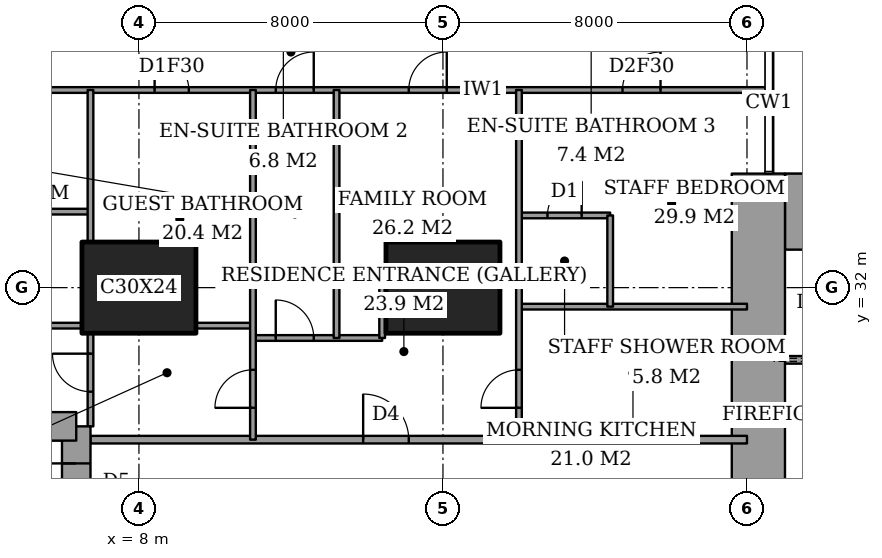
"""IFC4 building model, lengths in metres.
Left out: names, types, materials, properties, quantities, classifications, styles, units other than length and angle.
Written with IfcOpenShell. Run it as: python <this file> out.ifc"""

import sys

from ifc_helpers import new_model, si_unit, direction, frame, frame_2d, origin, origin_2d, place, context, subcontext, project, spatial, rectangle, extrude, element, fill, save


model = new_model("IFC4")
c1 = context("Model", 3, precision=1e-05, world=origin(), true_north=direction((0.0, 1.0)))
c2 = subcontext(c1, "Body", "Model", "MODEL_VIEW")
j1 = project(units=[si_unit("LENGTHUNIT", "METRE"), si_unit("PLANEANGLEUNIT", "RADIAN")], contexts=[c1])
p1 = place(None, origin())
s1 = spatial("IfcSite", under=j1, at=p1, CompositionType="ELEMENT")
p2 = place(p1, origin())
s2 = spatial("IfcBuilding", under=s1, at=p2, CompositionType="ELEMENT")
p3 = place(p2, frame((0.0, 0.0, 203.8)))
s3 = spatial("IfcBuildingStorey", under=s2, at=p3, CompositionType="ELEMENT", Elevation=203.8)
for number, where, z_axis, x_axis in (
    (1, (8.0, 32.0, 0.0), (0.0, 0.0, 1.0), (1.0, 0.0, 0.0)),
    (2, (16.0, 32.0, 0.0), (0.0, 0.0, 1.0), (1.0, 0.0, 0.0)),
):
    element("IfcColumn", number, at=place(p3, frame(where, z_axis=z_axis, x_axis=x_axis)), inside=s3, PredefinedType="COLUMN", context=c2, shape_type="SweptSolid", body=[
        extrude(rectangle(XDim=3.0, YDim=2.4, at=origin_2d()), origin(), (0.0, 0.0, 1.0), 3.6),
    ])
p4 = place(p3, frame((25.0, 34.0, 0.0), z_axis=(0.0, 0.0, 1.0), x_axis=(1.0, 0.0, 0.0)))
e3 = element("IfcWall", 3, at=p4, inside=s3, PredefinedType="SHEAR", context=c2, shape_type="SweptSolid", body=[
    extrude(rectangle(XDim=3.15, YDim=2.0, at=frame_2d((1.575, 0.0))), origin(), (0.0, 0.0, 1.0), 3.6),
])
p5 = place(p3, frame((24.3, 23.15, 0.0), z_axis=(0.0, 0.0, 1.0), x_axis=(0.0, 1.0, 0.0)))
e4 = element("IfcWall", 4, at=p5, inside=s3, PredefinedType="SHEAR", context=c2, shape_type="SweptSolid", body=[
    extrude(rectangle(XDim=11.85, YDim=1.4, at=frame_2d((5.925, 0.0))), origin(), (0.0, 0.0, 1.0), 3.6),
])
p6 = place(p5, frame((0.75, 0.0, 0.0)))
e5 = element("IfcOpeningElement", 5, at=p6, cuts=e4, PredefinedType="OPENING", context=c2, shape_type="SweptSolid", body=[
    extrude(rectangle(XDim=1.8, YDim=2.4, at=frame_2d((0.9, 1.2))), frame((0.0, 0.71, 0.0), z_axis=(0.0, -1.0, 0.0), x_axis=(1.0, 0.0, 0.0)), (0.0, 0.0, 1.0), 1.42),
])
p7 = place(p3, frame((6.35, 19.65, 0.0), z_axis=(0.0, 0.0, 1.0), x_axis=(0.0, 1.0, 0.0)))
e6 = element("IfcWall", 6, at=p7, inside=s3, PredefinedType="SHEAR", context=c2, shape_type="SweptSolid", body=[
    extrude(rectangle(XDim=8.7, YDim=0.75, at=frame_2d((4.35, 0.0))), origin(), (0.0, 0.0, 1.0), 3.6),
])
p8 = place(p7, frame((6.725, 0.0, 0.0)))
e7 = element("IfcOpeningElement", 7, at=p8, cuts=e6, PredefinedType="OPENING", context=c2, shape_type="SweptSolid", body=[
    extrude(rectangle(XDim=1.0, YDim=2.1, at=frame_2d((0.5, 1.05))), frame((0.0, 0.385, 0.0), z_axis=(0.0, -1.0, 0.0), x_axis=(1.0, 0.0, 0.0)), (0.0, 0.0, 1.0), 0.77),
])
p9 = place(p3, frame((6.35, 28.35, 0.0), z_axis=(0.0, 0.0, 1.0), x_axis=(-1.0, 0.0, 0.0)))
e8 = element("IfcWall", 8, at=p9, inside=s3, PredefinedType="SHEAR", context=c2, shape_type="SweptSolid", body=[
    extrude(rectangle(XDim=4.45, YDim=0.75, at=frame_2d((2.225, 0.0))), origin(), (0.0, 0.0, 1.0), 3.6),
])
p10 = place(p3, frame((6.725, 28.0, 0.0), z_axis=(0.0, 0.0, 1.0), x_axis=(1.0, 0.0, 0.0)))
e9 = element("IfcWall", 9, at=p10, inside=s3, PredefinedType="PARTITIONING", context=c2, shape_type="SweptSolid", body=[
    extrude(rectangle(XDim=17.275, YDim=0.2, at=frame_2d((8.637, 0.0))), origin(), (0.0, 0.0, 1.0), 3.35),
])
p11 = place(p10, frame((7.175, 0.0, 0.0)))
e10 = element("IfcOpeningElement", 10, at=p11, cuts=e9, PredefinedType="OPENING", context=c2, shape_type="SweptSolid", body=[
    extrude(rectangle(XDim=1.2, YDim=2.4, at=frame_2d((0.6, 1.2))), frame((0.0, 0.11, 0.0), z_axis=(0.0, -1.0, 0.0), x_axis=(1.0, 0.0, 0.0)), (0.0, 0.0, 1.0), 0.22),
])
p12 = place(p3, frame((11.0, 30.675, 0.0), z_axis=(0.0, 0.0, 1.0), x_axis=(1.0, 0.0, 0.0)))
e11 = element("IfcWall", 11, at=p12, inside=s3, PredefinedType="PARTITIONING", context=c2, shape_type="SweptSolid", body=[
    extrude(rectangle(XDim=3.4, YDim=0.15, at=frame_2d((1.7, 0.0))), origin(), (0.0, 0.0, 1.0), 3.35),
])
p13 = place(p12, frame((0.6, 0.0, 0.0)))
e12 = element("IfcOpeningElement", 12, at=p13, cuts=e11, PredefinedType="OPENING", context=c2, shape_type="SweptSolid", body=[
    extrude(rectangle(XDim=1.0, YDim=2.1, at=frame_2d((0.5, 1.05))), frame((0.0, 0.085, 0.0), z_axis=(0.0, -1.0, 0.0), x_axis=(1.0, 0.0, 0.0)), (0.0, 0.0, 1.0), 0.17),
])
p14 = place(p3, frame((-0.45, 31.0, 0.0), z_axis=(0.0, 0.0, 1.0), x_axis=(1.0, 0.0, 0.0)))
e13 = element("IfcWall", 13, at=p14, inside=s3, PredefinedType="PARTITIONING", context=c2, shape_type="SweptSolid", body=[
    extrude(rectangle(XDim=6.95, YDim=0.15, at=frame_2d((3.475, 0.0))), origin(), (0.0, 0.0, 1.0), 3.35),
])
p15 = place(p3, frame((9.5, 31.0, 0.0), z_axis=(0.0, 0.0, 1.0), x_axis=(1.0, 0.0, 0.0)))
e14 = element("IfcWall", 14, at=p15, inside=s3, PredefinedType="PARTITIONING", context=c2, shape_type="SweptSolid", body=[
    extrude(rectangle(XDim=1.5, YDim=0.15, at=frame_2d((0.75, 0.0))), origin(), (0.0, 0.0, 1.0), 3.35),
])
p16 = place(p3, frame((18.0, 31.5, 0.0), z_axis=(0.0, 0.0, 1.0), x_axis=(1.0, 0.0, 0.0)))
e15 = element("IfcWall", 15, at=p16, inside=s3, PredefinedType="PARTITIONING", context=c2, shape_type="SweptSolid", body=[
    extrude(rectangle(XDim=6.0, YDim=0.15, at=frame_2d((3.0, 0.0))), origin(), (0.0, 0.0, 1.0), 3.35),
])
p17 = place(p3, frame((17.5, 32.1, 0.0), z_axis=(0.0, 0.0, 1.0), x_axis=(1.0, 0.0, 0.0)))
e16 = element("IfcWall", 16, at=p17, inside=s3, PredefinedType="PARTITIONING", context=c2, shape_type="SweptSolid", body=[
    extrude(rectangle(XDim=0.5, YDim=0.15, at=frame_2d((0.25, 0.0))), origin(), (0.0, 0.0, 1.0), 2.634),
])
p18 = place(p3, frame((18.0, 33.9, 0.0), z_axis=(0.0, 0.0, 1.0), x_axis=(1.0, 0.0, 0.0)))
e17 = element("IfcWall", 17, at=p18, inside=s3, PredefinedType="PARTITIONING", context=c2, shape_type="SweptSolid", body=[
    extrude(rectangle(XDim=2.4, YDim=0.15, at=frame_2d((1.2, 0.0))), origin(), (0.0, 0.0, 1.0), 3.35),
])
p19 = place(p18, frame((0.75, 0.0, 0.0)))
e18 = element("IfcOpeningElement", 18, at=p19, cuts=e17, PredefinedType="OPENING", context=c2, shape_type="SweptSolid", body=[
    extrude(rectangle(XDim=0.9, YDim=2.1, at=frame_2d((0.45, 1.05))), frame((0.0, 0.085, 0.0), z_axis=(0.0, -1.0, 0.0), x_axis=(1.0, 0.0, 0.0)), (0.0, 0.0, 1.0), 0.17),
])
p20 = place(p3, frame((4.125, 34.0, 0.0), z_axis=(0.0, 0.0, 1.0), x_axis=(1.0, 0.0, 0.0)))
e19 = element("IfcWall", 19, at=p20, inside=s3, PredefinedType="PARTITIONING", context=c2, shape_type="SweptSolid", body=[
    extrude(rectangle(XDim=2.6, YDim=0.15, at=frame_2d((1.3, 0.0))), origin(), (0.0, 0.0, 1.0), 3.35),
])
p21 = place(p3, frame((-0.45, 37.2, 0.0), z_axis=(0.0, 0.0, 1.0), x_axis=(1.0, 0.0, 0.0)))
e20 = element("IfcWall", 20, at=p21, inside=s3, PredefinedType="PARTITIONING", context=c2, shape_type="SweptSolid", body=[
    extrude(rectangle(XDim=25.011, YDim=0.15, at=frame_2d((12.505, 0.0))), origin(), (0.0, 0.0, 1.0), 3.35),
])
p22 = place(p21, frame((12.05, 0.0, 0.0)))
e21 = element("IfcOpeningElement", 21, at=p22, cuts=e20, PredefinedType="OPENING", context=c2, shape_type="SweptSolid", body=[
    extrude(rectangle(XDim=1.0, YDim=2.1, at=frame_2d((0.5, 1.05))), frame((0.0, 0.085, 0.0), z_axis=(0.0, -1.0, 0.0), x_axis=(1.0, 0.0, 0.0)), (0.0, 0.0, 1.0), 0.17),
])
p23 = place(p21, frame((3.087, 0.0, 0.0)))
e22 = element("IfcOpeningElement", 22, at=p23, cuts=e20, PredefinedType="OPENING", context=c2, shape_type="SweptSolid", body=[
    extrude(rectangle(XDim=1.0, YDim=2.1, at=frame_2d((0.5, 1.05))), frame((0.0, 0.085, 0.0), z_axis=(0.0, -1.0, 0.0), x_axis=(1.0, 0.0, 0.0)), (0.0, 0.0, 1.0), 0.17),
])
p24 = place(p21, frame((8.863, 0.0, 0.0)))
e23 = element("IfcOpeningElement", 23, at=p24, cuts=e20, PredefinedType="OPENING", context=c2, shape_type="SweptSolid", body=[
    extrude(rectangle(XDim=0.9, YDim=2.1, at=frame_2d((0.45, 1.05))), frame((0.0, 0.085, 0.0), z_axis=(0.0, -1.0, 0.0), x_axis=(1.0, 0.0, 0.0)), (0.0, 0.0, 1.0), 0.17),
])
p25 = place(p21, frame((15.55, 0.0, 0.0)))
e24 = element("IfcOpeningElement", 24, at=p25, cuts=e20, PredefinedType="OPENING", context=c2, shape_type="SweptSolid", body=[
    extrude(rectangle(XDim=1.0, YDim=2.1, at=frame_2d((0.5, 1.05))), frame((0.0, 0.085, 0.0), z_axis=(0.0, -1.0, 0.0), x_axis=(1.0, 0.0, 0.0)), (0.0, 0.0, 1.0), 0.17),
])
p26 = place(p21, frame((21.175, 0.0, 0.0)))
e25 = element("IfcOpeningElement", 25, at=p26, cuts=e20, PredefinedType="OPENING", context=c2, shape_type="SweptSolid", body=[
    extrude(rectangle(XDim=1.0, YDim=2.1, at=frame_2d((0.5, 1.05))), frame((0.0, 0.085, 0.0), z_axis=(0.0, -1.0, 0.0), x_axis=(1.0, 0.0, 0.0)), (0.0, 0.0, 1.0), 0.17),
])
p27 = place(p3, frame((6.725, 28.35, 0.0), z_axis=(0.0, 0.0, 1.0), x_axis=(0.0, 1.0, 0.0)))
e26 = element("IfcWall", 26, at=p27, inside=s3, PredefinedType="PARTITIONING", context=c2, shape_type="SweptSolid", body=[
    extrude(rectangle(XDim=2.45, YDim=0.15, at=frame_2d((1.225, 0.0))), origin(), (0.0, 0.0, 1.0), 3.35),
])
p28 = place(p27, frame((0.913, 0.0, 0.0)))
e27 = element("IfcOpeningElement", 27, at=p28, cuts=e26, PredefinedType="OPENING", context=c2, shape_type="SweptSolid", body=[
    extrude(rectangle(XDim=1.0, YDim=2.1, at=frame_2d((0.5, 1.05))), frame((0.0, 0.085, 0.0), z_axis=(0.0, -1.0, 0.0), x_axis=(1.0, 0.0, 0.0)), (0.0, 0.0, 1.0), 0.17),
])
p29 = place(p3, frame((6.725, 33.2, 0.0), z_axis=(0.0, 0.0, 1.0), x_axis=(0.0, 1.0, 0.0)))
e28 = element("IfcWall", 28, at=p29, inside=s3, PredefinedType="PARTITIONING", context=c2, shape_type="SweptSolid", body=[
    extrude(rectangle(XDim=4.0, YDim=0.15, at=frame_2d((2.0, 0.0))), origin(), (0.0, 0.0, 1.0), 3.35),
])
p30 = place(p3, frame((11.0, 28.0, 0.0), z_axis=(0.0, 0.0, 1.0), x_axis=(0.0, 1.0, 0.0)))
e29 = element("IfcWall", 29, at=p30, inside=s3, PredefinedType="PARTITIONING", context=c2, shape_type="SweptSolid", body=[
    extrude(rectangle(XDim=9.2, YDim=0.15, at=frame_2d((4.6, 0.0))), origin(), (0.0, 0.0, 1.0), 3.35),
])
p31 = place(p30, frame((0.837, 0.0, 0.0)))
e30 = element("IfcOpeningElement", 30, at=p31, cuts=e29, PredefinedType="OPENING", context=c2, shape_type="SweptSolid", body=[
    extrude(rectangle(XDim=1.0, YDim=2.1, at=frame_2d((0.5, 1.05))), frame((0.0, 0.085, 0.0), z_axis=(0.0, -1.0, 0.0), x_axis=(1.0, 0.0, 0.0)), (0.0, 0.0, 1.0), 0.17),
])
p32 = place(p3, frame((13.2, 30.675, 0.0), z_axis=(0.0, 0.0, 1.0), x_axis=(0.0, 1.0, 0.0)))
e31 = element("IfcWall", 31, at=p32, inside=s3, PredefinedType="PARTITIONING", context=c2, shape_type="SweptSolid", body=[
    extrude(rectangle(XDim=6.525, YDim=0.15, at=frame_2d((3.262, 0.0))), origin(), (0.0, 0.0, 1.0), 3.35),
])
p33 = place(p3, frame((14.4, 30.675, 0.0), z_axis=(0.0, 0.0, 1.0), x_axis=(0.0, 1.0, 0.0)))
e32 = element("IfcWall", 32, at=p33, inside=s3, PredefinedType="PARTITIONING", context=c2, shape_type="SweptSolid", body=[
    extrude(rectangle(XDim=1.425, YDim=0.15, at=frame_2d((0.712, 0.0))), origin(), (0.0, 0.0, 1.0), 3.35),
])
p34 = place(p3, frame((18.0, 28.0, 0.0), z_axis=(0.0, 0.0, 1.0), x_axis=(0.0, 1.0, 0.0)))
e33 = element("IfcWall", 33, at=p34, inside=s3, PredefinedType="PARTITIONING", context=c2, shape_type="SweptSolid", body=[
    extrude(rectangle(XDim=9.2, YDim=0.15, at=frame_2d((4.6, 0.0))), origin(), (0.0, 0.0, 1.0), 3.35),
])
p35 = place(p34, frame((0.837, 0.0, 0.0)))
e34 = element("IfcOpeningElement", 34, at=p35, cuts=e33, PredefinedType="OPENING", context=c2, shape_type="SweptSolid", body=[
    extrude(rectangle(XDim=1.0, YDim=2.1, at=frame_2d((0.5, 1.05))), frame((0.0, 0.085, 0.0), z_axis=(0.0, -1.0, 0.0), x_axis=(1.0, 0.0, 0.0)), (0.0, 0.0, 1.0), 0.17),
])
p36 = place(p3, frame((20.4, 31.5, 0.0), z_axis=(0.0, 0.0, 1.0), x_axis=(0.0, 1.0, 0.0)))
e35 = element("IfcWall", 35, at=p36, inside=s3, PredefinedType="PARTITIONING", context=c2, shape_type="SweptSolid", body=[
    extrude(rectangle(XDim=2.4, YDim=0.15, at=frame_2d((1.2, 0.0))), origin(), (0.0, 0.0, 1.0), 3.35),
])
p37 = place(p3, frame((25.0, 30.1, 0.0), z_axis=(0.0, 0.0, 1.0), x_axis=(1.0, 0.0, 0.0)))
e36 = element("IfcWall", 36, at=p37, inside=s3, PredefinedType="PARTITIONING", context=c2, shape_type="SweptSolid", body=[
    extrude(rectangle(XDim=12.7, YDim=0.2, at=frame_2d((6.35, 0.0))), origin(), (0.0, 0.0, 1.0), 3.6),
])
p38 = place(p37, frame((4.25, 0.0, 0.0)))
e37 = element("IfcOpeningElement", 37, at=p38, cuts=e36, PredefinedType="OPENING", context=c2, shape_type="SweptSolid", body=[
    extrude(rectangle(XDim=1.1, YDim=2.1, at=frame_2d((0.55, 1.05))), frame((0.0, 0.11, 0.0), z_axis=(0.0, -1.0, 0.0), x_axis=(1.0, 0.0, 0.0)), (0.0, 0.0, 1.0), 0.22),
])
p39 = place(p37, frame((7.45, 0.0, 0.0)))
e38 = element("IfcOpeningElement", 38, at=p39, cuts=e36, PredefinedType="OPENING", context=c2, shape_type="SweptSolid", body=[
    extrude(rectangle(XDim=1.1, YDim=2.1, at=frame_2d((0.55, 1.05))), frame((0.0, 0.11, 0.0), z_axis=(0.0, -1.0, 0.0), x_axis=(1.0, 0.0, 0.0)), (0.0, 0.0, 1.0), 0.22),
])
p40 = place(p37, frame((10.65, 0.0, 0.0)))
e39 = element("IfcOpeningElement", 39, at=p40, cuts=e36, PredefinedType="OPENING", context=c2, shape_type="SweptSolid", body=[
    extrude(rectangle(XDim=1.1, YDim=2.1, at=frame_2d((0.55, 1.05))), frame((0.0, 0.11, 0.0), z_axis=(0.0, -1.0, 0.0), x_axis=(1.0, 0.0, 0.0)), (0.0, 0.0, 1.0), 0.22),
])
p41 = place(p37, frame((0.9, 0.0, 0.0)))
e40 = element("IfcOpeningElement", 40, at=p41, cuts=e36, PredefinedType="OPENING", context=c2, shape_type="SweptSolid", body=[
    extrude(rectangle(XDim=1.2, YDim=2.1, at=frame_2d((0.6, 1.05))), frame((0.0, 0.11, 0.0), z_axis=(0.0, -1.0, 0.0), x_axis=(1.0, 0.0, 0.0)), (0.0, 0.0, 1.0), 0.22),
])
p42 = place(p22, origin())
e41 = element("IfcDoor", 41, at=p42, inside=s3, OperationType="SINGLE_SWING_LEFT", PredefinedType="DOOR", context=c2, shape_type="SweptSolid", body=[
    extrude(rectangle(XDim=1.0, YDim=2.1, at=frame_2d((0.5, 1.05))), frame((0.0, 0.025, 0.0), z_axis=(0.0, -1.0, 0.0), x_axis=(1.0, 0.0, 0.0)), (0.0, 0.0, 1.0), 0.05),
])
fill(e21, e41)
p43 = place(p28, origin())
e42 = element("IfcDoor", 42, at=p43, inside=s3, OperationType="SINGLE_SWING_LEFT", PredefinedType="DOOR", context=c2, shape_type="SweptSolid", body=[
    extrude(rectangle(XDim=1.0, YDim=2.1, at=frame_2d((0.5, 1.05))), frame((0.0, 0.025, 0.0), z_axis=(0.0, -1.0, 0.0), x_axis=(1.0, 0.0, 0.0)), (0.0, 0.0, 1.0), 0.05),
])
fill(e27, e42)
p44 = place(p24, origin())
e43 = element("IfcDoor", 43, at=p44, inside=s3, OperationType="SINGLE_SWING_RIGHT", PredefinedType="DOOR", context=c2, shape_type="SweptSolid", body=[
    extrude(rectangle(XDim=0.9, YDim=2.1, at=frame_2d((0.45, 1.05))), frame((0.0, 0.025, 0.0), z_axis=(0.0, -1.0, 0.0), x_axis=(1.0, 0.0, 0.0)), (0.0, 0.0, 1.0), 0.05),
])
fill(e23, e43)
p45 = place(p31, origin())
e44 = element("IfcDoor", 44, at=p45, inside=s3, OperationType="SINGLE_SWING_RIGHT", PredefinedType="DOOR", context=c2, shape_type="SweptSolid", body=[
    extrude(rectangle(XDim=1.0, YDim=2.1, at=frame_2d((0.5, 1.05))), frame((0.0, 0.025, 0.0), z_axis=(0.0, -1.0, 0.0), x_axis=(1.0, 0.0, 0.0)), (0.0, 0.0, 1.0), 0.05),
])
fill(e30, e44)
p46 = place(p11, origin())
e45 = element("IfcDoor", 45, at=p46, inside=s3, OperationType="SINGLE_SWING_RIGHT", PredefinedType="DOOR", context=c2, shape_type="SweptSolid", body=[
    extrude(rectangle(XDim=1.2, YDim=2.4, at=frame_2d((0.6, 1.2))), frame((0.0, 0.025, 0.0), z_axis=(0.0, -1.0, 0.0), x_axis=(1.0, 0.0, 0.0)), (0.0, 0.0, 1.0), 0.05),
])
fill(e10, e45)
p47 = place(p13, origin())
e46 = element("IfcDoor", 46, at=p47, inside=s3, OperationType="SINGLE_SWING_RIGHT", PredefinedType="DOOR", context=c2, shape_type="SweptSolid", body=[
    extrude(rectangle(XDim=1.0, YDim=2.1, at=frame_2d((0.5, 1.05))), frame((0.0, 0.025, 0.0), z_axis=(0.0, -1.0, 0.0), x_axis=(1.0, 0.0, 0.0)), (0.0, 0.0, 1.0), 0.05),
])
fill(e12, e46)
p48 = place(p25, origin())
e47 = element("IfcDoor", 47, at=p48, inside=s3, OperationType="SINGLE_SWING_LEFT", PredefinedType="DOOR", context=c2, shape_type="SweptSolid", body=[
    extrude(rectangle(XDim=1.0, YDim=2.1, at=frame_2d((0.5, 1.05))), frame((0.0, 0.025, 0.0), z_axis=(0.0, -1.0, 0.0), x_axis=(1.0, 0.0, 0.0)), (0.0, 0.0, 1.0), 0.05),
])
fill(e24, e47)
p49 = place(p19, origin())
e48 = element("IfcDoor", 48, at=p49, inside=s3, OperationType="SINGLE_SWING_LEFT", PredefinedType="DOOR", context=c2, shape_type="SweptSolid", body=[
    extrude(rectangle(XDim=0.9, YDim=2.1, at=frame_2d((0.45, 1.05))), frame((0.0, 0.025, 0.0), z_axis=(0.0, -1.0, 0.0), x_axis=(1.0, 0.0, 0.0)), (0.0, 0.0, 1.0), 0.05),
])
fill(e18, e48)
p50 = place(p26, origin())
e49 = element("IfcDoor", 49, at=p50, inside=s3, OperationType="SINGLE_SWING_LEFT", PredefinedType="DOOR", context=c2, shape_type="SweptSolid", body=[
    extrude(rectangle(XDim=1.0, YDim=2.1, at=frame_2d((0.5, 1.05))), frame((0.0, 0.025, 0.0), z_axis=(0.0, -1.0, 0.0), x_axis=(1.0, 0.0, 0.0)), (0.0, 0.0, 1.0), 0.05),
])
fill(e25, e49)
p51 = place(p35, origin())
e50 = element("IfcDoor", 50, at=p51, inside=s3, OperationType="SINGLE_SWING_RIGHT", PredefinedType="DOOR", context=c2, shape_type="SweptSolid", body=[
    extrude(rectangle(XDim=1.0, YDim=2.1, at=frame_2d((0.5, 1.05))), frame((0.0, 0.025, 0.0), z_axis=(0.0, -1.0, 0.0), x_axis=(1.0, 0.0, 0.0)), (0.0, 0.0, 1.0), 0.05),
])
fill(e34, e50)
p52 = place(p8, origin())
e51 = element("IfcDoor", 51, at=p52, inside=s3, OperationType="SINGLE_SWING_LEFT", PredefinedType="DOOR", context=c2, shape_type="SweptSolid", body=[
    extrude(rectangle(XDim=1.0, YDim=2.1, at=frame_2d((0.5, 1.05))), frame((0.0, 0.025, 0.0), z_axis=(0.0, -1.0, 0.0), x_axis=(1.0, 0.0, 0.0)), (0.0, 0.0, 1.0), 0.05),
])
fill(e7, e51)
save(model, sys.argv[1])
